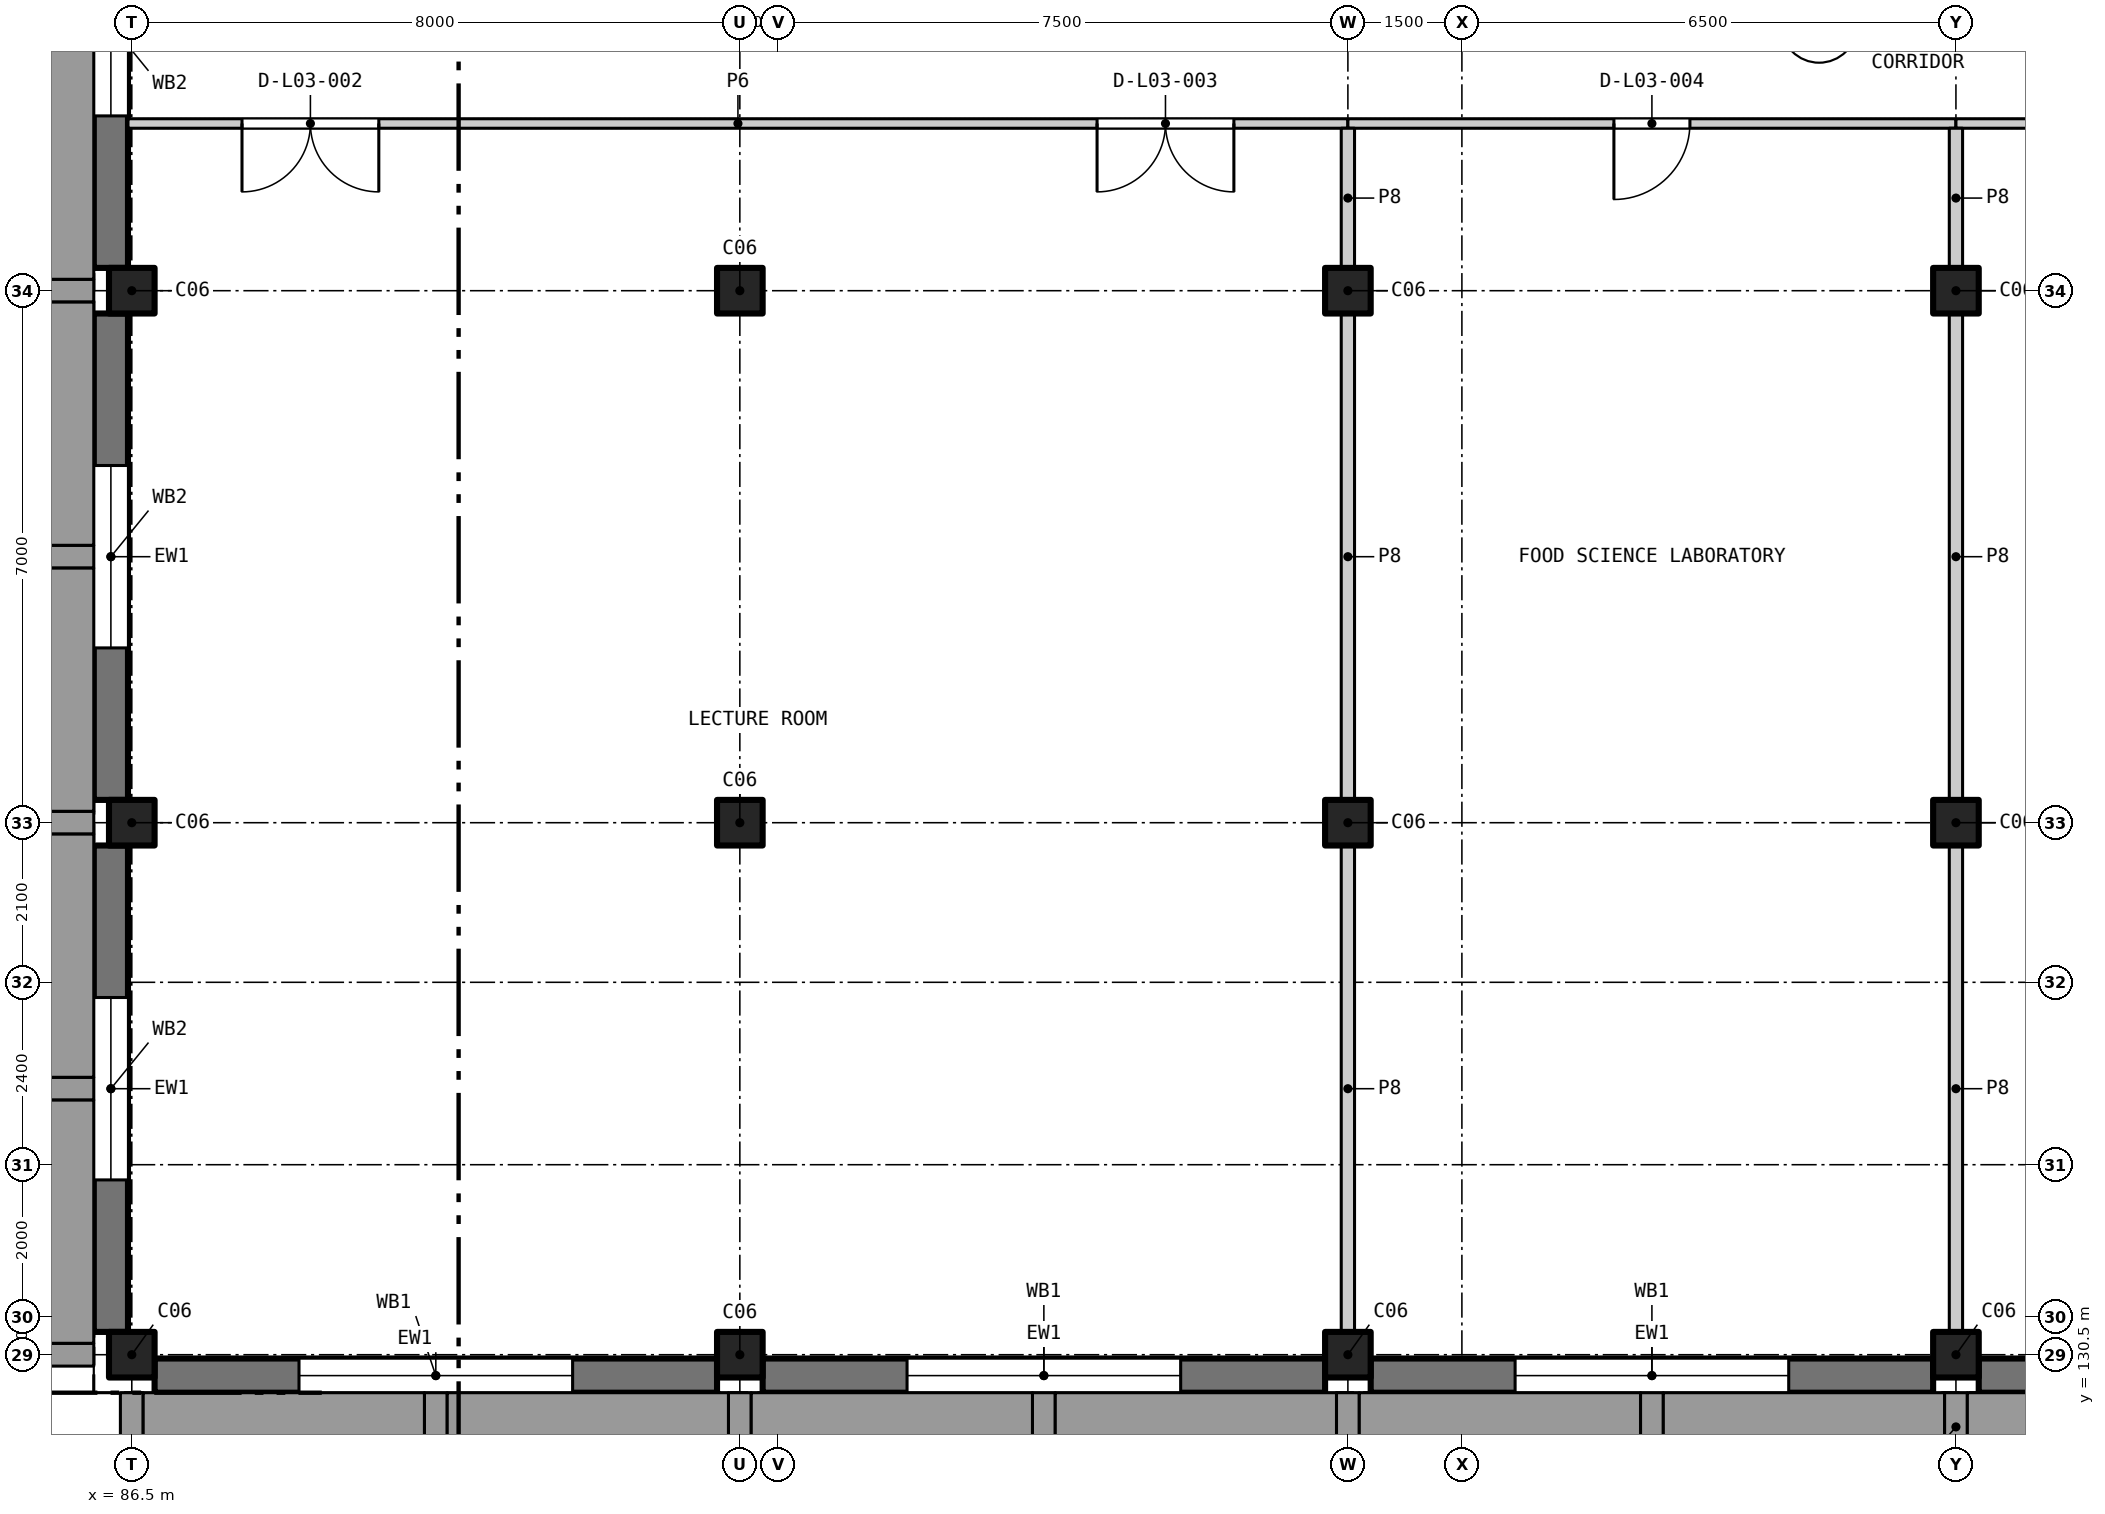
"""IFC4 building model, lengths in metres.
Left out: names, types, materials, properties, quantities, classifications, styles, units other than length and angle.
Written with IfcOpenShell. Run it as: python <this file> out.ifc"""

import sys

from ifc_helpers import new_model, si_unit, direction, frame, frame_2d, origin, origin_2d, place, context, subcontext, project, spatial, rectangle, extrude, element, fill, save


model = new_model("IFC4")
c1 = context("Model", 3, precision=1e-05, world=origin(), true_north=direction((0.0, 1.0)))
c2 = subcontext(c1, "Body", "Model", "MODEL_VIEW")
j1 = project(units=[si_unit("LENGTHUNIT", "METRE"), si_unit("PLANEANGLEUNIT", "RADIAN")], contexts=[c1])
p1 = place(None, origin())
s1 = spatial("IfcSite", under=j1, at=p1, CompositionType="ELEMENT")
p2 = place(p1, origin())
s2 = spatial("IfcBuilding", under=s1, at=p2, CompositionType="ELEMENT")
p3 = place(p2, frame((0.0, 0.0, 14.4)))
s3 = spatial("IfcBuildingStorey", under=s2, at=p3, CompositionType="ELEMENT", Elevation=14.4)
for number, where, z_axis, x_axis in (
    (1, (86.5, 130.5, 0.0), (0.0, 0.0, 1.0), (1.0, 0.0, 0.0)),
    (2, (86.5, 137.5, 0.0), (0.0, 0.0, 1.0), (1.0, 0.0, 0.0)),
    (3, (86.5, 144.5, 0.0), (0.0, 0.0, 1.0), (1.0, 0.0, 0.0)),
    (4, (94.5, 130.5, 0.0), (0.0, 0.0, 1.0), (1.0, 0.0, 0.0)),
    (5, (94.5, 137.5, 0.0), (0.0, 0.0, 1.0), (1.0, 0.0, 0.0)),
    (6, (94.5, 144.5, 0.0), (0.0, 0.0, 1.0), (1.0, 0.0, 0.0)),
    (7, (102.5, 130.5, 0.0), (0.0, 0.0, 1.0), (1.0, 0.0, 0.0)),
    (8, (102.5, 137.5, 0.0), (0.0, 0.0, 1.0), (1.0, 0.0, 0.0)),
    (9, (102.5, 144.5, 0.0), (0.0, 0.0, 1.0), (1.0, 0.0, 0.0)),
    (10, (110.5, 130.5, 0.0), (0.0, 0.0, 1.0), (1.0, 0.0, 0.0)),
    (11, (110.5, 137.5, 0.0), (0.0, 0.0, 1.0), (1.0, 0.0, 0.0)),
    (12, (110.5, 144.5, 0.0), (0.0, 0.0, 1.0), (1.0, 0.0, 0.0)),
):
    element("IfcColumn", number, at=place(p3, frame(where, z_axis=z_axis, x_axis=x_axis)), inside=s3, PredefinedType="COLUMN", context=c2, shape_type="SweptSolid", body=[
        extrude(rectangle(XDim=0.6, YDim=0.6, at=origin_2d()), origin(), (0.0, 0.0, 1.0), 3.9),
    ])
p4 = place(p3, frame((134.0, 130.125, 4.2), z_axis=(0.0, 0.0, 1.0), x_axis=(-1.0, 0.0, 0.0)))
e13 = element("IfcWall", 13, at=p4, inside=s3, PredefinedType="PARAPET", context=c2, shape_type="SweptSolid", body=[
    extrude(rectangle(XDim=48.0, YDim=0.25, at=frame_2d((24.0, 0.0))), origin(), (0.0, 0.0, 1.0), 1.1),
])
p5 = place(p3, frame((86.125, 130.25, 4.2), z_axis=(0.0, 0.0, 1.0), x_axis=(0.0, 1.0, 0.0)))
e14 = element("IfcWall", 14, at=p5, inside=s3, PredefinedType="PARAPET", context=c2, shape_type="SweptSolid", body=[
    extrude(rectangle(XDim=35.5, YDim=0.25, at=frame_2d((17.75, 0.0))), origin(), (0.0, 0.0, 1.0), 1.1),
])
p6 = place(p3, frame((94.2, 130.225, 0.0), z_axis=(0.0, 0.0, 1.0), x_axis=(-1.0, 0.0, 0.0)))
e15 = element("IfcWall", 15, at=p6, inside=s3, PredefinedType="SOLIDWALL", context=c2, shape_type="SweptSolid", body=[
    extrude(rectangle(XDim=7.4, YDim=0.45, at=frame_2d((3.7, 0.0))), origin(), (0.0, 0.0, 1.0), 3.0),
])
p7 = place(p6, frame((1.9, 0.0, 0.9)))
e16 = element("IfcOpeningElement", 16, at=p7, cuts=e15, PredefinedType="OPENING", context=c2, shape_type="SweptSolid", body=[
    extrude(rectangle(XDim=3.6, YDim=1.6, at=frame_2d((1.8, 0.8))), frame((0.0, 0.235, 0.0), z_axis=(0.0, -1.0, 0.0), x_axis=(1.0, 0.0, 0.0)), (0.0, 0.0, 1.0), 0.47),
])
p8 = place(p3, frame((102.2, 130.225, 0.0), z_axis=(0.0, 0.0, 1.0), x_axis=(-1.0, 0.0, 0.0)))
e17 = element("IfcWall", 17, at=p8, inside=s3, PredefinedType="SOLIDWALL", context=c2, shape_type="SweptSolid", body=[
    extrude(rectangle(XDim=7.4, YDim=0.45, at=frame_2d((3.7, 0.0))), origin(), (0.0, 0.0, 1.0), 3.0),
])
p9 = place(p8, frame((1.9, 0.0, 0.9)))
e18 = element("IfcOpeningElement", 18, at=p9, cuts=e17, PredefinedType="OPENING", context=c2, shape_type="SweptSolid", body=[
    extrude(rectangle(XDim=3.6, YDim=1.6, at=frame_2d((1.8, 0.8))), frame((0.0, 0.235, 0.0), z_axis=(0.0, -1.0, 0.0), x_axis=(1.0, 0.0, 0.0)), (0.0, 0.0, 1.0), 0.47),
])
p10 = place(p3, frame((110.2, 130.225, 0.0), z_axis=(0.0, 0.0, 1.0), x_axis=(-1.0, 0.0, 0.0)))
e19 = element("IfcWall", 19, at=p10, inside=s3, PredefinedType="SOLIDWALL", context=c2, shape_type="SweptSolid", body=[
    extrude(rectangle(XDim=7.4, YDim=0.45, at=frame_2d((3.7, 0.0))), origin(), (0.0, 0.0, 1.0), 3.0),
])
p11 = place(p10, frame((1.9, 0.0, 0.9)))
e20 = element("IfcOpeningElement", 20, at=p11, cuts=e19, PredefinedType="OPENING", context=c2, shape_type="SweptSolid", body=[
    extrude(rectangle(XDim=3.6, YDim=1.6, at=frame_2d((1.8, 0.8))), frame((0.0, 0.235, 0.0), z_axis=(0.0, -1.0, 0.0), x_axis=(1.0, 0.0, 0.0)), (0.0, 0.0, 1.0), 0.47),
])
p12 = place(p3, frame((118.2, 130.225, 0.0), z_axis=(0.0, 0.0, 1.0), x_axis=(-1.0, 0.0, 0.0)))
e21 = element("IfcWall", 21, at=p12, inside=s3, PredefinedType="SOLIDWALL", context=c2, shape_type="SweptSolid", body=[
    extrude(rectangle(XDim=7.4, YDim=0.45, at=frame_2d((3.7, 0.0))), origin(), (0.0, 0.0, 1.0), 3.0),
])
p13 = place(p12, frame((1.9, 0.0, 0.9)))
e22 = element("IfcOpeningElement", 22, at=p13, cuts=e21, PredefinedType="OPENING", context=c2, shape_type="SweptSolid", body=[
    extrude(rectangle(XDim=3.6, YDim=1.6, at=frame_2d((1.8, 0.8))), frame((0.0, 0.235, 0.0), z_axis=(0.0, -1.0, 0.0), x_axis=(1.0, 0.0, 0.0)), (0.0, 0.0, 1.0), 0.47),
])
p14 = place(p3, frame((86.225, 130.8, 0.0), z_axis=(0.0, 0.0, 1.0), x_axis=(0.0, 1.0, 0.0)))
e23 = element("IfcWall", 23, at=p14, inside=s3, PredefinedType="SOLIDWALL", context=c2, shape_type="SweptSolid", body=[
    extrude(rectangle(XDim=6.4, YDim=0.45, at=frame_2d((3.2, 0.0))), origin(), (0.0, 0.0, 1.0), 3.1),
])
p15 = place(p14, frame((2.0, 0.0, 0.9)))
e24 = element("IfcOpeningElement", 24, at=p15, cuts=e23, PredefinedType="OPENING", context=c2, shape_type="SweptSolid", body=[
    extrude(rectangle(XDim=2.4, YDim=1.6, at=frame_2d((1.2, 0.8))), frame((0.0, 0.235, 0.0), z_axis=(0.0, -1.0, 0.0), x_axis=(1.0, 0.0, 0.0)), (0.0, 0.0, 1.0), 0.47),
])
p16 = place(p3, frame((86.225, 137.8, 0.0), z_axis=(0.0, 0.0, 1.0), x_axis=(0.0, 1.0, 0.0)))
e25 = element("IfcWall", 25, at=p16, inside=s3, PredefinedType="SOLIDWALL", context=c2, shape_type="SweptSolid", body=[
    extrude(rectangle(XDim=6.4, YDim=0.45, at=frame_2d((3.2, 0.0))), origin(), (0.0, 0.0, 1.0), 3.1),
])
p17 = place(p16, frame((2.0, 0.0, 0.9)))
e26 = element("IfcOpeningElement", 26, at=p17, cuts=e25, PredefinedType="OPENING", context=c2, shape_type="SweptSolid", body=[
    extrude(rectangle(XDim=2.4, YDim=1.6, at=frame_2d((1.2, 0.8))), frame((0.0, 0.235, 0.0), z_axis=(0.0, -1.0, 0.0), x_axis=(1.0, 0.0, 0.0)), (0.0, 0.0, 1.0), 0.47),
])
p18 = place(p3, frame((86.225, 144.8, 0.0), z_axis=(0.0, 0.0, 1.0), x_axis=(0.0, 1.0, 0.0)))
e27 = element("IfcWall", 27, at=p18, inside=s3, PredefinedType="SOLIDWALL", context=c2, shape_type="SweptSolid", body=[
    extrude(rectangle(XDim=6.4, YDim=0.45, at=frame_2d((3.2, 0.0))), origin(), (0.0, 0.0, 1.0), 3.1),
])
p19 = place(p18, frame((2.0, 0.0, 0.9)))
e28 = element("IfcOpeningElement", 28, at=p19, cuts=e27, PredefinedType="OPENING", context=c2, shape_type="SweptSolid", body=[
    extrude(rectangle(XDim=2.4, YDim=1.6, at=frame_2d((1.2, 0.8))), frame((0.0, 0.235, 0.0), z_axis=(0.0, -1.0, 0.0), x_axis=(1.0, 0.0, 0.0)), (0.0, 0.0, 1.0), 0.47),
])
p20 = place(p3, frame((86.45, 146.7, 0.0), z_axis=(0.0, 0.0, 1.0), x_axis=(1.0, 0.0, 0.0)))
e29 = element("IfcWall", 29, at=p20, inside=s3, PredefinedType="PARTITIONING", context=c2, shape_type="SweptSolid", body=[
    extrude(rectangle(XDim=16.05, YDim=0.125, at=frame_2d((8.025, 0.0))), origin(), (0.0, 0.0, 1.0), 3.9),
])
p21 = place(p20, frame((1.5, 0.0, 0.0)))
e30 = element("IfcOpeningElement", 30, at=p21, cuts=e29, PredefinedType="OPENING", context=c2, shape_type="SweptSolid", body=[
    extrude(rectangle(XDim=1.8, YDim=2.1, at=frame_2d((0.9, 1.05))), frame((0.0, 0.073, 0.0), z_axis=(0.0, -1.0, 0.0), x_axis=(1.0, 0.0, 0.0)), (0.0, 0.0, 1.0), 0.145),
])
p22 = place(p20, frame((12.75, 0.0, 0.0)))
e31 = element("IfcOpeningElement", 31, at=p22, cuts=e29, PredefinedType="OPENING", context=c2, shape_type="SweptSolid", body=[
    extrude(rectangle(XDim=1.8, YDim=2.1, at=frame_2d((0.9, 1.05))), frame((0.0, 0.073, 0.0), z_axis=(0.0, -1.0, 0.0), x_axis=(1.0, 0.0, 0.0)), (0.0, 0.0, 1.0), 0.145),
])
p23 = place(p3, frame((102.5, 146.7, 0.0), z_axis=(0.0, 0.0, 1.0), x_axis=(1.0, 0.0, 0.0)))
e32 = element("IfcWall", 32, at=p23, inside=s3, PredefinedType="PARTITIONING", context=c2, shape_type="SweptSolid", body=[
    extrude(rectangle(XDim=8.0, YDim=0.125, at=frame_2d((4.0, 0.0))), origin(), (0.0, 0.0, 1.0), 3.9),
])
p24 = place(p23, frame((3.5, 0.0, 0.0)))
e33 = element("IfcOpeningElement", 33, at=p24, cuts=e32, PredefinedType="OPENING", context=c2, shape_type="SweptSolid", body=[
    extrude(rectangle(XDim=1.0, YDim=2.1, at=frame_2d((0.5, 1.05))), frame((0.0, 0.073, 0.0), z_axis=(0.0, -1.0, 0.0), x_axis=(1.0, 0.0, 0.0)), (0.0, 0.0, 1.0), 0.145),
])
p25 = place(p3, frame((110.5, 146.7, 0.0), z_axis=(0.0, 0.0, 1.0), x_axis=(1.0, 0.0, 0.0)))
e34 = element("IfcWall", 34, at=p25, inside=s3, PredefinedType="PARTITIONING", context=c2, shape_type="SweptSolid", body=[
    extrude(rectangle(XDim=8.0, YDim=0.125, at=frame_2d((4.0, 0.0))), origin(), (0.0, 0.0, 1.0), 3.9),
])
p26 = place(p25, frame((3.5, 0.0, 0.0)))
e35 = element("IfcOpeningElement", 35, at=p26, cuts=e34, PredefinedType="OPENING", context=c2, shape_type="SweptSolid", body=[
    extrude(rectangle(XDim=1.0, YDim=2.1, at=frame_2d((0.5, 1.05))), frame((0.0, 0.073, 0.0), z_axis=(0.0, -1.0, 0.0), x_axis=(1.0, 0.0, 0.0)), (0.0, 0.0, 1.0), 0.145),
])
for number, where, z_axis, x_axis in (
    (36, (102.5, 130.8, 0.0), (0.0, 0.0, 1.0), (0.0, 1.0, 0.0)),
    (37, (102.5, 137.8, 0.0), (0.0, 0.0, 1.0), (0.0, 1.0, 0.0)),
):
    element("IfcWall", number, at=place(p3, frame(where, z_axis=z_axis, x_axis=x_axis)), inside=s3, PredefinedType="PARTITIONING", context=c2, shape_type="SweptSolid", body=[
        extrude(rectangle(XDim=6.4, YDim=0.175, at=frame_2d((3.2, 0.0))), origin(), (0.0, 0.0, 1.0), 3.1),
    ])
p27 = place(p3, frame((102.5, 144.8, 0.0), z_axis=(0.0, 0.0, 1.0), x_axis=(0.0, 1.0, 0.0)))
e38 = element("IfcWall", 38, at=p27, inside=s3, PredefinedType="PARTITIONING", context=c2, shape_type="SweptSolid", body=[
    extrude(rectangle(XDim=1.837, YDim=0.175, at=frame_2d((0.919, 0.0))), origin(), (0.0, 0.0, 1.0), 3.1),
])
for number, where, z_axis, x_axis in (
    (39, (110.5, 130.8, 0.0), (0.0, 0.0, 1.0), (0.0, 1.0, 0.0)),
    (40, (110.5, 137.8, 0.0), (0.0, 0.0, 1.0), (0.0, 1.0, 0.0)),
):
    element("IfcWall", number, at=place(p3, frame(where, z_axis=z_axis, x_axis=x_axis)), inside=s3, PredefinedType="PARTITIONING", context=c2, shape_type="SweptSolid", body=[
        extrude(rectangle(XDim=6.4, YDim=0.175, at=frame_2d((3.2, 0.0))), origin(), (0.0, 0.0, 1.0), 3.1),
    ])
p28 = place(p3, frame((110.5, 144.8, 0.0), z_axis=(0.0, 0.0, 1.0), x_axis=(0.0, 1.0, 0.0)))
e41 = element("IfcWall", 41, at=p28, inside=s3, PredefinedType="PARTITIONING", context=c2, shape_type="SweptSolid", body=[
    extrude(rectangle(XDim=1.837, YDim=0.175, at=frame_2d((0.919, 0.0))), origin(), (0.0, 0.0, 1.0), 3.1),
])
p29 = place(p7, origin())
e42 = element("IfcWindow", 42, at=p29, inside=s3, PartitioningType="SINGLE_PANEL", PredefinedType="WINDOW", context=c2, shape_type="SweptSolid", body=[
    extrude(rectangle(XDim=3.6, YDim=1.6, at=frame_2d((1.8, 0.8))), frame((0.0, -0.125, 0.0), z_axis=(0.0, -1.0, 0.0), x_axis=(1.0, 0.0, 0.0)), (0.0, 0.0, 1.0), 0.06),
])
fill(e16, e42)
p30 = place(p9, origin())
e43 = element("IfcWindow", 43, at=p30, inside=s3, PartitioningType="SINGLE_PANEL", PredefinedType="WINDOW", context=c2, shape_type="SweptSolid", body=[
    extrude(rectangle(XDim=3.6, YDim=1.6, at=frame_2d((1.8, 0.8))), frame((0.0, -0.125, 0.0), z_axis=(0.0, -1.0, 0.0), x_axis=(1.0, 0.0, 0.0)), (0.0, 0.0, 1.0), 0.06),
])
fill(e18, e43)
p31 = place(p11, origin())
e44 = element("IfcWindow", 44, at=p31, inside=s3, PartitioningType="SINGLE_PANEL", PredefinedType="WINDOW", context=c2, shape_type="SweptSolid", body=[
    extrude(rectangle(XDim=3.6, YDim=1.6, at=frame_2d((1.8, 0.8))), frame((0.0, -0.125, 0.0), z_axis=(0.0, -1.0, 0.0), x_axis=(1.0, 0.0, 0.0)), (0.0, 0.0, 1.0), 0.06),
])
fill(e20, e44)
p32 = place(p15, origin())
e45 = element("IfcWindow", 45, at=p32, inside=s3, PartitioningType="SINGLE_PANEL", PredefinedType="WINDOW", context=c2, shape_type="SweptSolid", body=[
    extrude(rectangle(XDim=2.4, YDim=1.6, at=frame_2d((1.2, 0.8))), frame((0.0, -0.125, 0.0), z_axis=(0.0, -1.0, 0.0), x_axis=(1.0, 0.0, 0.0)), (0.0, 0.0, 1.0), 0.06),
])
fill(e24, e45)
p33 = place(p17, origin())
e46 = element("IfcWindow", 46, at=p33, inside=s3, PartitioningType="SINGLE_PANEL", PredefinedType="WINDOW", context=c2, shape_type="SweptSolid", body=[
    extrude(rectangle(XDim=2.4, YDim=1.6, at=frame_2d((1.2, 0.8))), frame((0.0, -0.125, 0.0), z_axis=(0.0, -1.0, 0.0), x_axis=(1.0, 0.0, 0.0)), (0.0, 0.0, 1.0), 0.06),
])
fill(e26, e46)
p34 = place(p19, origin())
e47 = element("IfcWindow", 47, at=p34, inside=s3, PartitioningType="SINGLE_PANEL", PredefinedType="WINDOW", context=c2, shape_type="SweptSolid", body=[
    extrude(rectangle(XDim=2.4, YDim=1.6, at=frame_2d((1.2, 0.8))), frame((0.0, -0.125, 0.0), z_axis=(0.0, -1.0, 0.0), x_axis=(1.0, 0.0, 0.0)), (0.0, 0.0, 1.0), 0.06),
])
fill(e28, e47)
p35 = place(p21, frame((1.8, 0.0, 0.0), z_axis=(0.0, 0.0, 1.0), x_axis=(-1.0, 0.0, 0.0)))
e48 = element("IfcDoor", 48, at=p35, inside=s3, OperationType="DOUBLE_DOOR_SINGLE_SWING", PredefinedType="DOOR", context=c2, shape_type="SweptSolid", body=[
    extrude(rectangle(XDim=1.8, YDim=2.1, at=frame_2d((0.9, 1.05))), frame((0.0, 0.025, 0.0), z_axis=(0.0, -1.0, 0.0), x_axis=(1.0, 0.0, 0.0)), (0.0, 0.0, 1.0), 0.05),
])
fill(e30, e48)
p36 = place(p22, frame((1.8, 0.0, 0.0), z_axis=(0.0, 0.0, 1.0), x_axis=(-1.0, 0.0, 0.0)))
e49 = element("IfcDoor", 49, at=p36, inside=s3, OperationType="DOUBLE_DOOR_SINGLE_SWING", PredefinedType="DOOR", context=c2, shape_type="SweptSolid", body=[
    extrude(rectangle(XDim=1.8, YDim=2.1, at=frame_2d((0.9, 1.05))), frame((0.0, 0.025, 0.0), z_axis=(0.0, -1.0, 0.0), x_axis=(1.0, 0.0, 0.0)), (0.0, 0.0, 1.0), 0.05),
])
fill(e31, e49)
p37 = place(p24, frame((1.0, 0.0, 0.0), z_axis=(0.0, 0.0, 1.0), x_axis=(-1.0, 0.0, 0.0)))
e50 = element("IfcDoor", 50, at=p37, inside=s3, OperationType="SINGLE_SWING_RIGHT", PredefinedType="DOOR", context=c2, shape_type="SweptSolid", body=[
    extrude(rectangle(XDim=1.0, YDim=2.1, at=frame_2d((0.5, 1.05))), frame((0.0, 0.025, 0.0), z_axis=(0.0, -1.0, 0.0), x_axis=(1.0, 0.0, 0.0)), (0.0, 0.0, 1.0), 0.05),
])
fill(e33, e50)
save(model, sys.argv[1])
